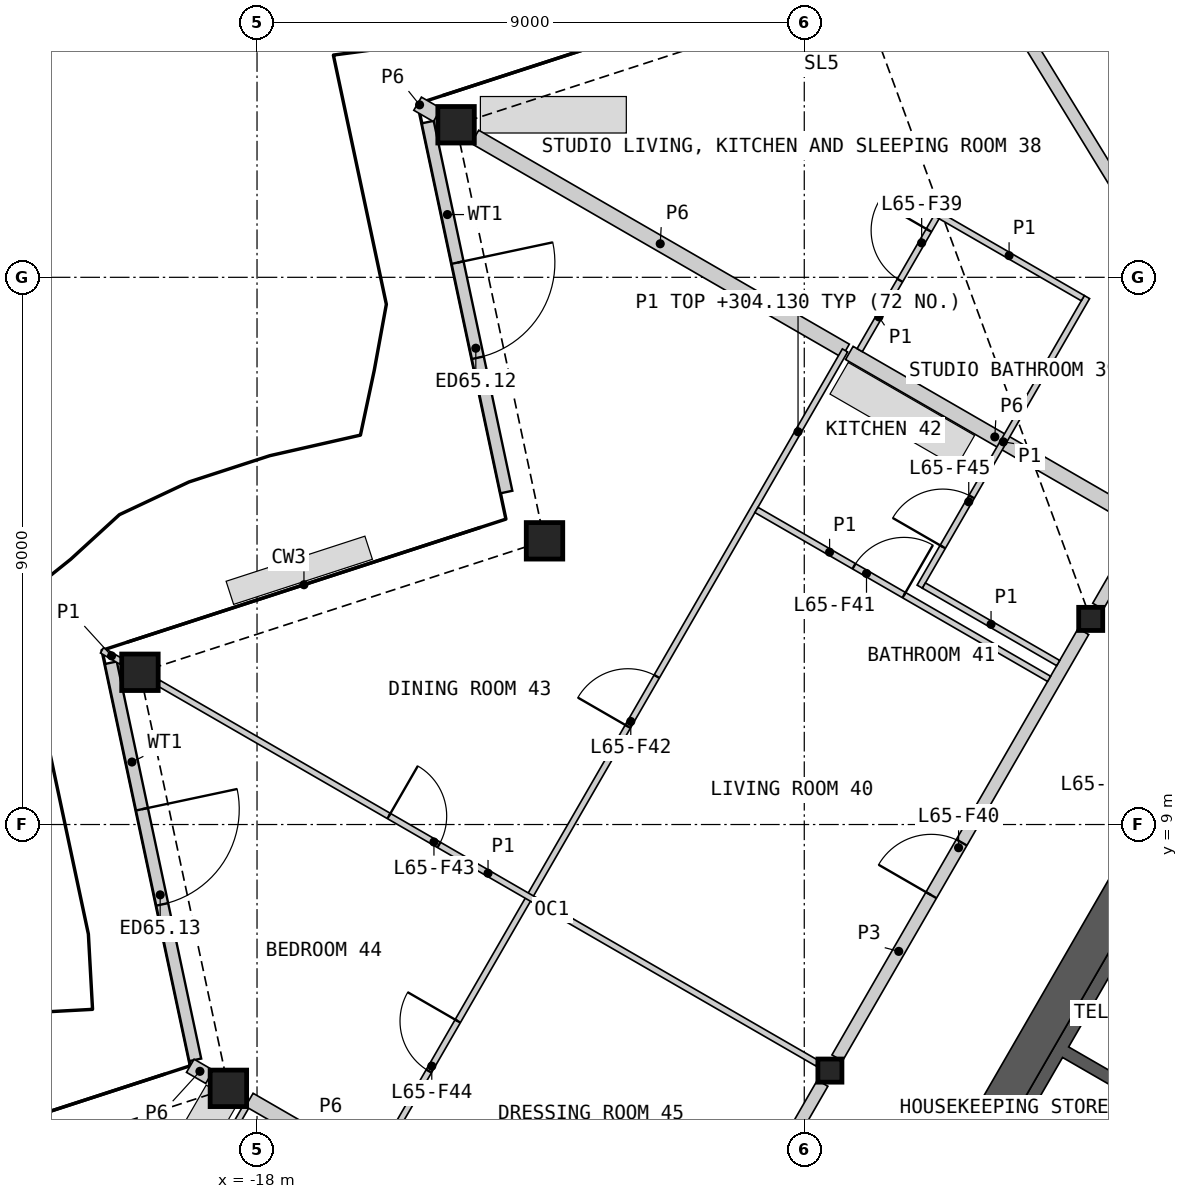
"""IFC4 building model, lengths in metres.
Left out: names, types, materials, properties, quantities, classifications, styles, units other than length and angle.
Written with IfcOpenShell. Run it as: python <this file> out.ifc"""

import sys

from ifc_helpers import new_model, si_unit, direction, frame, frame_2d, origin, origin_2d, place, context, subcontext, project, spatial, polyline, rectangle, hollow_rectangle, i_section, outline, extrude, element, fill, save


model = new_model("IFC4")
c1 = context("Model", 3, precision=1e-05, world=origin(), true_north=direction((0.0, 1.0)))
c2 = subcontext(c1, "Body", "Model", "MODEL_VIEW")
j1 = project(units=[si_unit("LENGTHUNIT", "METRE"), si_unit("PLANEANGLEUNIT", "RADIAN")], contexts=[c1])
p1 = place(None, origin())
s1 = spatial("IfcSite", under=j1, at=p1, CompositionType="ELEMENT")
p2 = place(p1, origin())
s2 = spatial("IfcBuilding", under=s1, at=p2, CompositionType="ELEMENT")
p3 = place(p2, frame((0.0, 0.0, 301.8)))
s3 = spatial("IfcBuildingStorey", under=s2, at=p3, CompositionType="ELEMENT", Elevation=301.8)
for number, where, z_axis, x_axis in (
    (1, (-14.727, 20.509, 0.0), (0.0, 0.0, 1.0), (1.0, 0.0, 0.0)),
    (2, (-13.272, 13.666, 0.0), (0.0, 0.0, 1.0), (1.0, 0.0, 0.0)),
    (3, (-19.926, 11.504, 0.0), (0.0, 0.0, 1.0), (1.0, 0.0, 0.0)),
    (4, (-18.471, 4.661, 0.0), (0.0, 0.0, 1.0), (1.0, 0.0, 0.0)),
):
    element("IfcColumn", number, at=place(p3, frame(where, z_axis=z_axis, x_axis=x_axis)), inside=s3, PredefinedType="COLUMN", context=c2, shape_type="SweptSolid", body=[
        extrude(hollow_rectangle(XDim=0.6, YDim=0.6, WallThickness=0.04, at=origin_2d()), origin(), (0.0, 0.0, 1.0), 3.4),
    ])
for number, where, z_axis, x_axis in (
    (5, (-4.289, 12.382, 0.0), (0.0, 0.0, 1.0), (1.0, 0.0, 0.0)),
    (6, (-8.578, 4.953, 0.0), (0.0, 0.0, 1.0), (1.0, 0.0, 0.0)),
):
    element("IfcColumn", number, at=place(p3, frame(where, z_axis=z_axis, x_axis=x_axis)), inside=s3, PredefinedType="COLUMN", context=c2, shape_type="SweptSolid", body=[
        extrude(i_section(OverallWidth=0.396, OverallDepth=0.381, WebThickness=0.019, FlangeThickness=0.03, at=origin_2d()), origin(), (0.0, 0.0, 1.0), 3.4),
    ])
p4 = place(p3, frame((-15.192, 20.553, 0.0), z_axis=(0.0, 0.0, 1.0), x_axis=(0.207920712138, -0.97814568315, 0.0)))
e7 = element("IfcWall", 7, at=p4, inside=s3, PredefinedType="SOLIDWALL", context=c2, shape_type="SweptSolid", body=[
    extrude(rectangle(XDim=6.221, YDim=0.2, at=frame_2d((3.11, 0.0))), origin(), (0.0, 0.0, 1.0), 2.488),
])
p5 = place(p4, frame((2.362, 0.0, 0.0)))
e8 = element("IfcOpeningElement", 8, at=p5, cuts=e7, PredefinedType="OPENING", context=c2, shape_type="SweptSolid", body=[
    extrude(rectangle(XDim=1.6, YDim=2.25, at=frame_2d((0.8, 1.125))), frame((0.0, 0.11, 0.0), z_axis=(0.0, -1.0, 0.0), x_axis=(1.0, 0.0, 0.0)), (0.0, 0.0, 1.0), 0.22),
])
p6 = place(p3, frame((-20.404, 11.661, 0.0), z_axis=(0.0, 0.0, 1.0), x_axis=(0.207893301034, -0.978151509422, 0.0)))
e9 = element("IfcWall", 9, at=p6, inside=s3, PredefinedType="SOLIDWALL", context=c2, shape_type="SweptSolid", body=[
    extrude(rectangle(XDim=6.677, YDim=0.2, at=frame_2d((3.339, 0.0))), origin(), (0.0, 0.0, 1.0), 2.488),
])
p7 = place(p6, frame((2.463, 0.0, 0.0)))
e10 = element("IfcOpeningElement", 10, at=p7, cuts=e9, PredefinedType="OPENING", context=c2, shape_type="SweptSolid", body=[
    extrude(rectangle(XDim=1.6, YDim=2.25, at=frame_2d((0.8, 1.125))), frame((0.0, 0.11, 0.0), z_axis=(0.0, -1.0, 0.0), x_axis=(1.0, 0.0, 0.0)), (0.0, 0.0, 1.0), 0.22),
])
p8 = place(p3, origin())
e11 = element("IfcWall", 11, at=p8, inside=s3, PredefinedType="SHEAR", context=c2, shape_type="SweptSolid", body=[
    extrude(outline(polyline([(-4.96, 0.208), (-7.131, 1.461), (-3.731, 7.35), (-1.561, 6.097), (-1.66, 5.924), (-3.652, 7.074), (-4.652, 5.342), (-2.66, 4.192), (-2.76, 4.019), (-4.752, 5.169), (-6.852, 1.531), (-4.861, 0.381), (-4.96, 0.208)])), origin(), (0.0, 0.0, 1.0), 3.1),
])
p9 = place(p3, frame((-1.631, 5.776, 0.0), z_axis=(0.0, 0.0, 1.0), x_axis=(-0.499992876559, -0.866029516466, 0.0)))
e12 = element("IfcWall", 12, at=p9, inside=s3, PredefinedType="SOLIDWALL", context=c2, shape_type="SweptSolid", body=[
    extrude(rectangle(XDim=6.486, YDim=0.2, at=frame_2d((3.243, 0.0))), origin(), (0.0, 0.0, 1.0), 3.1),
])
p10 = place(p9, frame((0.437, 0.0, 0.0)))
e13 = element("IfcOpeningElement", 13, at=p10, cuts=e12, PredefinedType="OPENING", context=c2, shape_type="SweptSolid", body=[
    extrude(rectangle(XDim=0.9, YDim=2.1, at=frame_2d((0.45, 1.05))), frame((0.0, 0.11, 0.0), z_axis=(0.0, -1.0, 0.0), x_axis=(1.0, 0.0, 0.0)), (0.0, 0.0, 1.0), 0.22),
])
p11 = place(p9, frame((3.737, 0.0, 0.0)))
e14 = element("IfcOpeningElement", 14, at=p11, cuts=e12, PredefinedType="OPENING", context=c2, shape_type="SweptSolid", body=[
    extrude(rectangle(XDim=0.9, YDim=2.1, at=frame_2d((0.45, 1.05))), frame((0.0, 0.11, 0.0), z_axis=(0.0, -1.0, 0.0), x_axis=(1.0, 0.0, 0.0)), (0.0, 0.0, 1.0), 0.22),
])
p12 = place(p3, frame((-3.639, 8.107, 0.0), z_axis=(0.0, 0.0, 1.0), x_axis=(-0.49999180351, -0.866030135978, 0.0)))
e15 = element("IfcWall", 15, at=p12, inside=s3, PredefinedType="SHEAR", context=c2, shape_type="SweptSolid", body=[
    extrude(rectangle(XDim=7.401, YDim=0.6, at=frame_2d((3.701, 0.0))), origin(), (0.0, 0.0, 1.0), 3.1),
])
p13 = place(p3, frame((-8.458, 5.16, 0.0), z_axis=(0.0, 0.0, 1.0), x_axis=(0.499984266882, 0.866034487114, 0.0)))
e16 = element("IfcWall", 16, at=p13, inside=s3, PredefinedType="PARTITIONING", context=c2, shape_type="SweptSolid", body=[
    extrude(rectangle(XDim=8.099, YDim=0.2, at=frame_2d((4.049, 0.0))), origin(), (0.0, 0.0, 1.0), 3.1),
])
p14 = place(p13, frame((3.093, 0.0, 0.0)))
e17 = element("IfcOpeningElement", 17, at=p14, cuts=e16, PredefinedType="OPENING", context=c2, shape_type="SweptSolid", body=[
    extrude(rectangle(XDim=1.0, YDim=2.1, at=frame_2d((0.5, 1.05))), frame((0.0, 0.11, 0.0), z_axis=(0.0, -1.0, 0.0), x_axis=(1.0, 0.0, 0.0)), (0.0, 0.0, 1.0), 0.22),
])
p15 = place(p3, frame((-12.748, -2.269, 0.0), z_axis=(0.0, 0.0, 1.0), x_axis=(0.499984266882, 0.866034487114, 0.0)))
e18 = element("IfcWall", 18, at=p15, inside=s3, PredefinedType="PARTITIONING", context=c2, shape_type="SweptSolid", body=[
    extrude(rectangle(XDim=8.099, YDim=0.2, at=frame_2d((4.049, 0.0))), origin(), (0.0, 0.0, 1.0), 3.1),
])
p16 = place(p15, frame((1.164, 0.0, 0.0)))
e19 = element("IfcOpeningElement", 19, at=p16, cuts=e18, PredefinedType="OPENING", context=c2, shape_type="SweptSolid", body=[
    extrude(rectangle(XDim=1.0, YDim=2.1, at=frame_2d((0.5, 1.05))), frame((0.0, 0.11, 0.0), z_axis=(0.0, -1.0, 0.0), x_axis=(1.0, 0.0, 0.0)), (0.0, 0.0, 1.0), 0.22),
])
p17 = place(p3, frame((-14.417, 20.311, 0.0), z_axis=(0.0, 0.0, 1.0), x_axis=(0.866027308682, -0.499996700606, 0.0)))
e20 = element("IfcWall", 20, at=p17, inside=s3, PredefinedType="PARTITIONING", context=c2, shape_type="SweptSolid", body=[
    extrude(rectangle(XDim=7.038, YDim=0.25, at=frame_2d((3.519, 0.0))), origin(), (0.0, 0.0, 1.0), 2.33),
])
p18 = place(p3, frame((-8.259, 16.756, 0.0), z_axis=(0.0, 0.0, 1.0), x_axis=(0.866023692682, -0.500002963705, 0.0)))
e21 = element("IfcWall", 21, at=p18, inside=s3, PredefinedType="PARTITIONING", context=c2, shape_type="SweptSolid", body=[
    extrude(rectangle(XDim=5.525, YDim=0.25, at=frame_2d((2.762, 0.0))), origin(), (0.0, 0.0, 1.0), 2.33),
])
p19 = place(p3, frame((-4.169, 12.59, 0.0), z_axis=(0.0, 0.0, 1.0), x_axis=(0.499950370306, 0.866054055606, 0.0)))
e22 = element("IfcWall", 22, at=p19, inside=s3, PredefinedType="PARTITIONING", context=c2, shape_type="SweptSolid", body=[
    extrude(rectangle(XDim=4.513, YDim=0.2, at=frame_2d((2.256, 0.0))), origin(), (0.0, 0.0, 1.0), 3.1),
])
p20 = place(p19, frame((2.459, 0.0, 0.0)))
e23 = element("IfcOpeningElement", 23, at=p20, cuts=e22, PredefinedType="OPENING", context=c2, shape_type="SweptSolid", body=[
    extrude(rectangle(XDim=1.0, YDim=2.1, at=frame_2d((0.5, 1.05))), frame((0.0, 0.11, 0.0), z_axis=(0.0, -1.0, 0.0), x_axis=(1.0, 0.0, 0.0)), (0.0, 0.0, 1.0), 0.22),
])
p21 = place(p3, frame((-18.127, 4.472, 0.0), z_axis=(0.0, 0.0, 1.0), x_axis=(0.866017755388, -0.500013247177, 0.0)))
e24 = element("IfcWall", 24, at=p21, inside=s3, PredefinedType="PARTITIONING", context=c2, shape_type="SweptSolid", body=[
    extrude(rectangle(XDim=2.447, YDim=0.25, at=frame_2d((1.223, 0.0))), origin(), (0.0, 0.0, 1.0), 2.33),
])
p22 = place(p3, frame((-15.359, 20.855, 0.0), z_axis=(0.0, 0.0, 1.0), x_axis=(0.865770353626, -0.500441499861, 0.0)))
e25 = element("IfcWall", 25, at=p22, inside=s3, PredefinedType="PARTITIONING", context=c2, shape_type="SweptSolid", body=[
    extrude(rectangle(XDim=0.372, YDim=0.25, at=frame_2d((0.186, 0.0))), origin(), (0.0, 0.0, 1.0), 2.33),
])
p23 = place(p3, frame((-19.097, 5.032, 0.0), z_axis=(0.0, 0.0, 1.0), x_axis=(0.86609656662, -0.499876722092, 0.0)))
e26 = element("IfcWall", 26, at=p23, inside=s3, PredefinedType="PARTITIONING", context=c2, shape_type="SweptSolid", body=[
    extrude(rectangle(XDim=0.365, YDim=0.25, at=frame_2d((0.183, 0.0))), origin(), (0.0, 0.0, 1.0), 2.33),
])
p24 = place(p3, frame((-9.802, 29.204, 0.0), z_axis=(0.0, 0.0, 1.0), x_axis=(0.522487920222, -0.852646687217, 0.0)))
e27 = element("IfcWall", 27, at=p24, inside=s3, PredefinedType="PARTITIONING", context=c2, shape_type="SweptSolid", body=[
    extrude(rectangle(XDim=14.904, YDim=0.2, at=frame_2d((7.452, 0.0))), origin(), (0.0, 0.0, 1.0), 2.33),
])
p25 = place(p3, frame((-16.054, 3.419, 0.0), z_axis=(0.0, 0.0, 1.0), x_axis=(0.499999256795, 0.866025832873, 0.0)))
e28 = element("IfcWall", 28, at=p25, inside=s3, PredefinedType="PARTITIONING", context=c2, shape_type="SweptSolid", body=[
    extrude(rectangle(XDim=15.448, YDim=0.1, at=frame_2d((7.724, 0.0))), origin(), (0.0, 0.0, 1.0), 2.33),
])
p26 = place(p25, frame((8.306, 0.0, 0.0)))
e29 = element("IfcOpeningElement", 29, at=p26, cuts=e28, PredefinedType="OPENING", context=c2, shape_type="SweptSolid", body=[
    extrude(rectangle(XDim=0.95, YDim=2.1, at=frame_2d((0.475, 1.05))), frame((0.0, 0.06, 0.0), z_axis=(0.0, -1.0, 0.0), x_axis=(1.0, 0.0, 0.0)), (0.0, 0.0, 1.0), 0.12),
])
p27 = place(p25, frame((1.76, 0.0, 0.0)))
e30 = element("IfcOpeningElement", 30, at=p27, cuts=e28, PredefinedType="OPENING", context=c2, shape_type="SweptSolid", body=[
    extrude(rectangle(XDim=0.95, YDim=2.1, at=frame_2d((0.475, 1.05))), frame((0.0, 0.06, 0.0), z_axis=(0.0, -1.0, 0.0), x_axis=(1.0, 0.0, 0.0)), (0.0, 0.0, 1.0), 0.12),
])
p28 = place(p3, frame((-19.615, 11.325, 0.0), z_axis=(0.0, 0.0, 1.0), x_axis=(0.86602139559, -0.500006942333, 0.0)))
e31 = element("IfcWall", 31, at=p28, inside=s3, PredefinedType="PARTITIONING", context=c2, shape_type="SweptSolid", body=[
    extrude(rectangle(XDim=12.505, YDim=0.1, at=frame_2d((6.252, 0.0))), origin(), (0.0, 0.0, 1.0), 2.33),
])
p29 = place(p28, frame((4.37, 0.0, 0.0)))
e32 = element("IfcOpeningElement", 32, at=p29, cuts=e31, PredefinedType="OPENING", context=c2, shape_type="SweptSolid", body=[
    extrude(rectangle(XDim=0.95, YDim=2.1, at=frame_2d((0.475, 1.05))), frame((0.0, 0.06, 0.0), z_axis=(0.0, -1.0, 0.0), x_axis=(1.0, 0.0, 0.0)), (0.0, 0.0, 1.0), 0.12),
])
p30 = place(p3, frame((-9.787, 14.174, 0.0), z_axis=(0.0, 0.0, 1.0), x_axis=(0.866031222068, -0.499989922303, 0.0)))
e33 = element("IfcWall", 33, at=p30, inside=s3, PredefinedType="PARTITIONING", context=c2, shape_type="SweptSolid", body=[
    extrude(rectangle(XDim=5.557, YDim=0.1, at=frame_2d((2.779, 0.0))), origin(), (0.0, 0.0, 1.0), 2.33),
])
p31 = place(p30, frame((1.853, 0.0, 0.0)))
e34 = element("IfcOpeningElement", 34, at=p31, cuts=e33, PredefinedType="OPENING", context=c2, shape_type="SweptSolid", body=[
    extrude(rectangle(XDim=0.95, YDim=2.1, at=frame_2d((0.475, 1.05))), frame((0.0, 0.06, 0.0), z_axis=(0.0, -1.0, 0.0), x_axis=(1.0, 0.0, 0.0)), (0.0, 0.0, 1.0), 0.12),
])
p32 = place(p3, frame((-7.101, 12.912, 0.0), z_axis=(0.0, 0.0, 1.0), x_axis=(0.499996545922, 0.866027397988, 0.0)))
e35 = element("IfcWall", 35, at=p32, inside=s3, PredefinedType="PARTITIONING", context=c2, shape_type="SweptSolid", body=[
    extrude(rectangle(XDim=5.5, YDim=0.1, at=frame_2d((2.75, 0.0))), origin(), (0.0, 0.0, 1.0), 2.33),
])
p33 = place(p32, frame((0.756, 0.0, 0.0)))
e36 = element("IfcOpeningElement", 36, at=p33, cuts=e35, PredefinedType="OPENING", context=c2, shape_type="SweptSolid", body=[
    extrude(rectangle(XDim=0.95, YDim=2.1, at=frame_2d((0.475, 1.05))), frame((0.0, 0.06, 0.0), z_axis=(0.0, -1.0, 0.0), x_axis=(1.0, 0.0, 0.0)), (0.0, 0.0, 1.0), 0.12),
])
p34 = place(p3, frame((-20.689, 0.014, 0.0), z_axis=(0.0, 0.0, 1.0), x_axis=(0.500003822013, 0.866023197133, 0.0)))
e37 = element("IfcWall", 37, at=p34, inside=s3, PredefinedType="PARTITIONING", context=c2, shape_type="SweptSolid", body=[
    extrude(rectangle(XDim=5.007, YDim=0.1, at=frame_2d((2.504, 0.0))), origin(), (0.0, 0.0, 1.0), 2.33),
])
p35 = place(p34, frame((0.86, 0.0, 0.0)))
e38 = element("IfcOpeningElement", 38, at=p35, cuts=e37, PredefinedType="OPENING", context=c2, shape_type="SweptSolid", body=[
    extrude(rectangle(XDim=0.95, YDim=2.1, at=frame_2d((0.475, 1.05))), frame((0.0, 0.06, 0.0), z_axis=(0.0, -1.0, 0.0), x_axis=(1.0, 0.0, 0.0)), (0.0, 0.0, 1.0), 0.12),
])
p36 = place(p3, frame((-6.844, 19.057, 0.0), z_axis=(0.0, 0.0, 1.0), x_axis=(0.866034573852, -0.49998411664, 0.0)))
e39 = element("IfcWall", 39, at=p36, inside=s3, PredefinedType="PARTITIONING", context=c2, shape_type="SweptSolid", body=[
    extrude(rectangle(XDim=2.8, YDim=0.1, at=frame_2d((1.4, 0.0))), origin(), (0.0, 0.0, 1.0), 2.33),
])
p37 = place(p3, frame((-7.032, 12.93, 0.0), z_axis=(0.0, 0.0, 1.0), x_axis=(0.866030925526, -0.499990435942, 0.0)))
e40 = element("IfcWall", 40, at=p37, inside=s3, PredefinedType="PARTITIONING", context=c2, shape_type="SweptSolid", body=[
    extrude(rectangle(XDim=2.55, YDim=0.1, at=frame_2d((1.275, 0.0))), origin(), (0.0, 0.0, 1.0), 2.33),
])
p38 = place(p3, frame((-8.088, 16.802, 0.0), z_axis=(0.0, 0.0, 1.0), x_axis=(0.499976333282, 0.866039067339, 0.0)))
e41 = element("IfcWall", 41, at=p38, inside=s3, PredefinedType="PARTITIONING", context=c2, shape_type="SweptSolid", body=[
    extrude(rectangle(XDim=2.525, YDim=0.1, at=frame_2d((1.262, 0.0))), origin(), (0.0, 0.0, 1.0), 2.33),
])
p39 = place(p38, frame((1.325, 0.0, 0.0)))
e42 = element("IfcOpeningElement", 42, at=p39, cuts=e41, PredefinedType="OPENING", context=c2, shape_type="SweptSolid", body=[
    extrude(rectangle(XDim=0.95, YDim=2.1, at=frame_2d((0.475, 1.05))), frame((0.0, 0.06, 0.0), z_axis=(0.0, -1.0, 0.0), x_axis=(1.0, 0.0, 0.0)), (0.0, 0.0, 1.0), 0.12),
])
p40 = place(p3, frame((-20.55, 11.865, 0.0), z_axis=(0.0, 0.0, 1.0), x_axis=(0.866039913117, -0.499974868256, 0.0)))
e43 = element("IfcWall", 43, at=p40, inside=s3, PredefinedType="PARTITIONING", context=c2, shape_type="SweptSolid", body=[
    extrude(rectangle(XDim=0.363, YDim=0.1, at=frame_2d((0.181, 0.0))), origin(), (0.0, 0.0, 1.0), 2.33),
])
p41 = place(p5, origin())
e44 = element("IfcDoor", 44, at=p41, inside=s3, OperationType="DOUBLE_DOOR_SINGLE_SWING", PredefinedType="DOOR", context=c2, shape_type="SweptSolid", body=[
    extrude(rectangle(XDim=1.6, YDim=2.25, at=frame_2d((0.8, 1.125))), frame((0.0, 0.025, 0.0), z_axis=(0.0, -1.0, 0.0), x_axis=(1.0, 0.0, 0.0)), (0.0, 0.0, 1.0), 0.05),
])
fill(e8, e44)
p42 = place(p7, origin())
e45 = element("IfcDoor", 45, at=p42, inside=s3, OperationType="DOUBLE_DOOR_SINGLE_SWING", PredefinedType="DOOR", context=c2, shape_type="SweptSolid", body=[
    extrude(rectangle(XDim=1.6, YDim=2.25, at=frame_2d((0.8, 1.125))), frame((0.0, 0.025, 0.0), z_axis=(0.0, -1.0, 0.0), x_axis=(1.0, 0.0, 0.0)), (0.0, 0.0, 1.0), 0.05),
])
fill(e10, e45)
p43 = place(p39, origin())
e46 = element("IfcDoor", 46, at=p43, inside=s3, OperationType="SINGLE_SWING_RIGHT", PredefinedType="DOOR", context=c2, shape_type="SweptSolid", body=[
    extrude(rectangle(XDim=0.95, YDim=2.1, at=frame_2d((0.475, 1.05))), frame((0.0, 0.025, 0.0), z_axis=(0.0, -1.0, 0.0), x_axis=(1.0, 0.0, 0.0)), (0.0, 0.0, 1.0), 0.05),
])
fill(e42, e46)
p44 = place(p14, origin())
e47 = element("IfcDoor", 47, at=p44, inside=s3, OperationType="SINGLE_SWING_LEFT", PredefinedType="DOOR", context=c2, shape_type="SweptSolid", body=[
    extrude(rectangle(XDim=1.0, YDim=2.1, at=frame_2d((0.5, 1.05))), frame((0.0, 0.025, 0.0), z_axis=(0.0, -1.0, 0.0), x_axis=(1.0, 0.0, 0.0)), (0.0, 0.0, 1.0), 0.05),
])
fill(e17, e47)
p45 = place(p31, origin())
e48 = element("IfcDoor", 48, at=p45, inside=s3, OperationType="SINGLE_SWING_RIGHT", PredefinedType="DOOR", context=c2, shape_type="SweptSolid", body=[
    extrude(rectangle(XDim=0.95, YDim=2.1, at=frame_2d((0.475, 1.05))), frame((0.0, 0.025, 0.0), z_axis=(0.0, -1.0, 0.0), x_axis=(1.0, 0.0, 0.0)), (0.0, 0.0, 1.0), 0.05),
])
fill(e34, e48)
p46 = place(p26, origin())
e49 = element("IfcDoor", 49, at=p46, inside=s3, OperationType="SINGLE_SWING_LEFT", PredefinedType="DOOR", context=c2, shape_type="SweptSolid", body=[
    extrude(rectangle(XDim=0.95, YDim=2.1, at=frame_2d((0.475, 1.05))), frame((0.0, 0.025, 0.0), z_axis=(0.0, -1.0, 0.0), x_axis=(1.0, 0.0, 0.0)), (0.0, 0.0, 1.0), 0.05),
])
fill(e29, e49)
p47 = place(p29, origin())
e50 = element("IfcDoor", 50, at=p47, inside=s3, OperationType="SINGLE_SWING_LEFT", PredefinedType="DOOR", context=c2, shape_type="SweptSolid", body=[
    extrude(rectangle(XDim=0.95, YDim=2.1, at=frame_2d((0.475, 1.05))), frame((0.0, 0.025, 0.0), z_axis=(0.0, -1.0, 0.0), x_axis=(1.0, 0.0, 0.0)), (0.0, 0.0, 1.0), 0.05),
])
fill(e32, e50)
p48 = place(p27, origin())
e51 = element("IfcDoor", 51, at=p48, inside=s3, OperationType="SINGLE_SWING_RIGHT", PredefinedType="DOOR", context=c2, shape_type="SweptSolid", body=[
    extrude(rectangle(XDim=0.95, YDim=2.1, at=frame_2d((0.475, 1.05))), frame((0.0, 0.025, 0.0), z_axis=(0.0, -1.0, 0.0), x_axis=(1.0, 0.0, 0.0)), (0.0, 0.0, 1.0), 0.05),
])
fill(e30, e51)
p49 = place(p33, origin())
e52 = element("IfcDoor", 52, at=p49, inside=s3, OperationType="SINGLE_SWING_LEFT", PredefinedType="DOOR", context=c2, shape_type="SweptSolid", body=[
    extrude(rectangle(XDim=0.95, YDim=2.1, at=frame_2d((0.475, 1.05))), frame((0.0, 0.025, 0.0), z_axis=(0.0, -1.0, 0.0), x_axis=(1.0, 0.0, 0.0)), (0.0, 0.0, 1.0), 0.05),
])
fill(e36, e52)
save(model, sys.argv[1])
